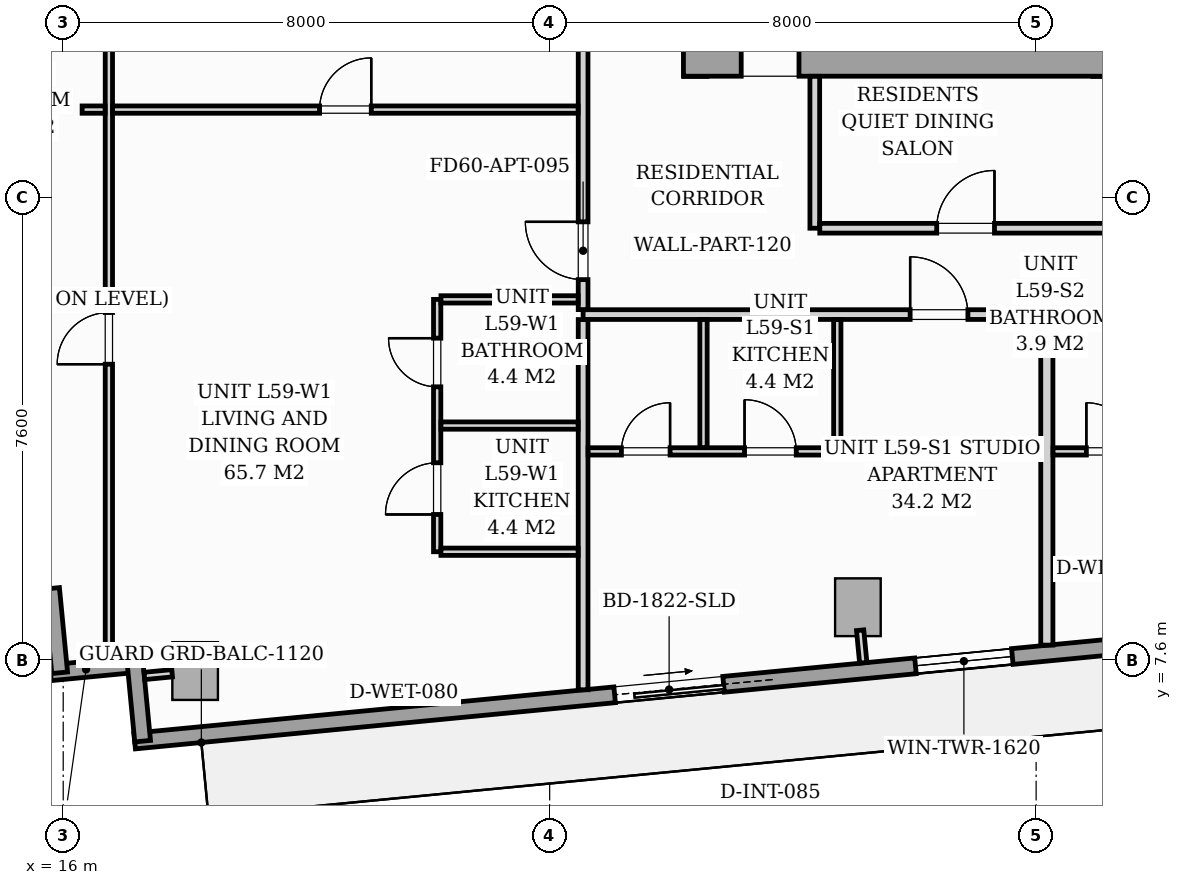
"""IFC4 building model, lengths in metres.
Left out: names, types, materials, properties, quantities, classifications, styles, units other than length and angle.
Written with IfcOpenShell. Run it as: python <this file> out.ifc"""

import sys

from ifc_helpers import new_model, si_unit, direction, frame, frame_2d, origin, origin_2d, place, context, subcontext, project, spatial, rectangle, i_section, extrude, source, transform, mapped, element, fill, save


model = new_model("IFC4")
c1 = context("Model", 3, precision=1e-05, world=origin(), true_north=direction((0.0, 1.0)))
c2 = subcontext(c1, "Body", "Model", "MODEL_VIEW")
j1 = project(units=[si_unit("LENGTHUNIT", "METRE"), si_unit("PLANEANGLEUNIT", "RADIAN")], contexts=[c1])
p1 = place(None, origin())
s1 = spatial("IfcSite", under=j1, at=p1, CompositionType="ELEMENT")
p2 = place(p1, origin())
s2 = spatial("IfcBuilding", under=s1, at=p2, CompositionType="ELEMENT")
p3 = place(p2, frame((0.0, 0.0, 205.0)))
s3 = spatial("IfcBuildingStorey", under=s2, at=p3, CompositionType="ELEMENT", Elevation=205.0)
m1 = source(origin(), c2, "Body", "SweptSolid", [
    extrude(i_section(OverallWidth=0.416, OverallDepth=0.446, WebThickness=0.039, FlangeThickness=0.063, FilletRadius=0.018, at=origin_2d()), origin(), (0.0, 0.0, 1.0), 3.196),
])
for number, where, z_axis, x_axis in (
    (1, (26.4, 17.4, 0.002), (0.0, 0.0, 1.0), (1.0, 0.0, 0.0)),
    (2, (33.12, 17.4, 0.002), (0.0, 0.0, 1.0), (1.0, 0.0, 0.0)),
):
    element("IfcColumn", number, at=place(p3, frame(where, z_axis=z_axis, x_axis=x_axis)), inside=s3, PredefinedType="PILASTER", context=c2, shape_type="MappedRepresentation", body=[
        mapped(m1, transform((0.0, 0.0, 0.0), scale=1.0)),
    ])
m2 = source(origin(), c2, "Body", "SweptSolid", [
    extrude(rectangle(XDim=0.75, YDim=0.95, at=origin_2d()), origin(), (0.0, 0.0, 1.0), 3.196),
])
for number, where, z_axis, x_axis in (
    (3, (18.169, 7.418, 0.002), (0.0, 0.0, 1.0), (0.995, 0.096, 0.0)),
    (4, (29.069, 8.467, 0.002), (0.0, 0.0, 1.0), (0.995, 0.096, 0.0)),
):
    element("IfcColumn", number, at=place(p3, frame(where, z_axis=z_axis, x_axis=x_axis)), inside=s3, PredefinedType="COLUMN", context=c2, shape_type="MappedRepresentation", body=[
        mapped(m2, transform((0.0, 0.0, 0.0), scale=1.0)),
    ])
p4 = place(p3, frame((17.07, 7.513, 0.0), z_axis=(0.0, 0.0, 1.0), x_axis=(-0.995391056452, -0.09589913835, 0.0)))
e5 = element("IfcWall", 5, at=p4, inside=s3, PredefinedType="STANDARD", context=c2, shape_type="SweptSolid", body=[
    extrude(rectangle(XDim=1.395, YDim=0.26, at=frame_2d((0.698, 0.0))), origin(), (0.0, 0.0, 1.0), 2.94),
])
p5 = place(p3, frame((15.942, 7.389, 0.0), z_axis=(0.0, 0.0, 1.0), x_axis=(-0.095742423056, 0.99540614245, 0.0)))
e6 = element("IfcWall", 6, at=p5, inside=s3, PredefinedType="STANDARD", context=c2, shape_type="SweptSolid", body=[
    extrude(rectangle(XDim=1.395, YDim=0.26, at=frame_2d((0.697, 0.0))), origin(), (0.0, 0.0, 1.0), 2.94),
])
p6 = place(p3, frame((33.201, 7.81, 0.0), z_axis=(0.0, 0.0, 1.0), x_axis=(-0.995397074604, -0.095836652014, 0.0)))
e7 = element("IfcWall", 7, at=p6, inside=s3, PredefinedType="STANDARD", context=c2, shape_type="SweptSolid", body=[
    extrude(rectangle(XDim=16.1, YDim=0.26, at=frame_2d((8.05, 0.0))), origin(), (0.0, 0.0, 1.0), 2.94),
])
p7 = place(p6, frame((6.37, 0.0, 0.0)))
e8 = element("IfcOpeningElement", 8, at=p7, cuts=e7, PredefinedType="OPENING", context=c2, shape_type="SweptSolid", body=[
    extrude(rectangle(XDim=1.8, YDim=2.06, at=frame_2d((0.9, 1.03))), frame((0.0, 0.14, 0.0), z_axis=(0.0, -1.0, 0.0), x_axis=(1.0, 0.0, 0.0)), (0.0, 0.0, 1.0), 0.28),
])
p8 = place(p6, frame((1.6, 0.0, 0.65)))
e9 = element("IfcOpeningElement", 9, at=p8, cuts=e7, PredefinedType="OPENING", context=c2, shape_type="SweptSolid", body=[
    extrude(rectangle(XDim=1.6, YDim=1.5, at=frame_2d((0.8, 0.75))), frame((0.0, 0.14, 0.0), z_axis=(0.0, -1.0, 0.0), x_axis=(1.0, 0.0, 0.0)), (0.0, 0.0, 1.0), 0.28),
])
p9 = place(p3, frame((17.306, 6.265, 0.0), z_axis=(0.0, 0.0, 1.0), x_axis=(-0.095915846097, 0.995389446633, 0.0)))
e10 = element("IfcWall", 10, at=p9, inside=s3, PredefinedType="STANDARD", context=c2, shape_type="SweptSolid", body=[
    extrude(rectangle(XDim=1.395, YDim=0.26, at=frame_2d((0.697, 0.0))), origin(), (0.0, 0.0, 1.0), 2.94),
])
p10 = place(p3, frame((26.2, 17.5, 0.0), z_axis=(0.0, 0.0, 1.0), x_axis=(1.0, 0.0, 0.0)))
e11 = element("IfcWall", 11, at=p10, inside=s3, PredefinedType="SHEAR", context=c2, shape_type="SweptSolid", body=[
    extrude(rectangle(XDim=19.6, YDim=0.6, at=frame_2d((9.8, 0.0))), origin(), (0.0, 0.0, 1.0), 3.2),
])
p11 = place(p10, frame((0.95, 0.0, 0.0)))
e12 = element("IfcOpeningElement", 12, at=p11, cuts=e11, PredefinedType="OPENING", context=c2, shape_type="SweptSolid", body=[
    extrude(rectangle(XDim=0.95, YDim=2.06, at=frame_2d((0.475, 1.03))), frame((0.0, 0.31, 0.0), z_axis=(0.0, -1.0, 0.0), x_axis=(1.0, 0.0, 0.0)), (0.0, 0.0, 1.0), 0.62),
])
p12 = place(p10, frame((9.38, 0.0, 0.0)))
e13 = element("IfcOpeningElement", 13, at=p12, cuts=e11, PredefinedType="OPENING", context=c2, shape_type="SweptSolid", body=[
    extrude(rectangle(XDim=0.85, YDim=2.0, at=frame_2d((0.425, 1.0))), frame((0.0, 0.31, 0.0), z_axis=(0.0, -1.0, 0.0), x_axis=(1.0, 0.0, 0.0)), (0.0, 0.0, 1.0), 0.62),
])
p13 = place(p10, frame((17.55, 0.0, 0.0)))
e14 = element("IfcOpeningElement", 14, at=p13, cuts=e11, PredefinedType="OPENING", context=c2, shape_type="SweptSolid", body=[
    extrude(rectangle(XDim=0.95, YDim=2.06, at=frame_2d((0.475, 1.03))), frame((0.0, 0.31, 0.0), z_axis=(0.0, -1.0, 0.0), x_axis=(1.0, 0.0, 0.0)), (0.0, 0.0, 1.0), 0.62),
])
p14 = place(p3, frame((24.55, 13.28, 0.0), z_axis=(0.0, 0.0, 1.0), x_axis=(1.0, 0.0, 0.0)))
e15 = element("IfcWall", 15, at=p14, inside=s3, PredefinedType="PARTITIONING", context=c2, shape_type="SweptSolid", body=[
    extrude(rectangle(XDim=22.9, YDim=0.16, at=frame_2d((11.45, 0.0))), origin(), (0.0, 0.0, 1.0), 2.94),
])
p15 = place(p14, frame((5.378, 0.0, 0.0)))
e16 = element("IfcOpeningElement", 16, at=p15, cuts=e15, PredefinedType="OPENING", context=c2, shape_type="SweptSolid", body=[
    extrude(rectangle(XDim=0.95, YDim=2.06, at=frame_2d((0.475, 1.03))), frame((0.0, 0.09, 0.0), z_axis=(0.0, -1.0, 0.0), x_axis=(1.0, 0.0, 0.0)), (0.0, 0.0, 1.0), 0.18),
])
p16 = place(p14, frame((13.025, 0.0, 0.0)))
e17 = element("IfcOpeningElement", 17, at=p16, cuts=e15, PredefinedType="OPENING", context=c2, shape_type="SweptSolid", body=[
    extrude(rectangle(XDim=0.95, YDim=2.06, at=frame_2d((0.475, 1.03))), frame((0.0, 0.09, 0.0), z_axis=(0.0, -1.0, 0.0), x_axis=(1.0, 0.0, 0.0)), (0.0, 0.0, 1.0), 0.18),
])
p17 = place(p14, frame((16.572, 0.0, 0.0)))
e18 = element("IfcOpeningElement", 18, at=p17, cuts=e15, PredefinedType="OPENING", context=c2, shape_type="SweptSolid", body=[
    extrude(rectangle(XDim=0.95, YDim=2.06, at=frame_2d((0.475, 1.03))), frame((0.0, 0.09, 0.0), z_axis=(0.0, -1.0, 0.0), x_axis=(1.0, 0.0, 0.0)), (0.0, 0.0, 1.0), 0.18),
])
p18 = place(p3, frame((24.55, 7.11, 0.0), z_axis=(0.0, 0.0, 1.0), x_axis=(0.0, 1.0, 0.0)))
e19 = element("IfcWall", 19, at=p18, inside=s3, PredefinedType="PARTITIONING", context=c2, shape_type="SweptSolid", body=[
    extrude(rectangle(XDim=6.088, YDim=0.16, at=frame_2d((3.044, 0.0))), origin(), (0.0, 0.0, 1.0), 2.94),
])
p19 = place(p3, frame((24.55, 13.362, 0.0), z_axis=(0.0, 0.0, 1.0), x_axis=(0.0, 1.0, 0.0)))
e20 = element("IfcWall", 20, at=p19, inside=s3, PredefinedType="PARTITIONING", context=c2, shape_type="SweptSolid", body=[
    extrude(rectangle(XDim=7.288, YDim=0.16, at=frame_2d((3.644, 0.0))), origin(), (0.0, 0.0, 1.0), 2.94),
])
p20 = place(p19, frame((0.493, 0.0, 0.0)))
e21 = element("IfcOpeningElement", 21, at=p20, cuts=e20, PredefinedType="OPENING", context=c2, shape_type="SweptSolid", body=[
    extrude(rectangle(XDim=0.95, YDim=2.06, at=frame_2d((0.475, 1.03))), frame((0.0, 0.09, 0.0), z_axis=(0.0, -1.0, 0.0), x_axis=(1.0, 0.0, 0.0)), (0.0, 0.0, 1.0), 0.18),
])
p21 = place(p19, frame((5.623, 0.0, 0.0)))
e22 = element("IfcOpeningElement", 22, at=p21, cuts=e20, PredefinedType="OPENING", context=c2, shape_type="SweptSolid", body=[
    extrude(rectangle(XDim=0.95, YDim=2.06, at=frame_2d((0.475, 1.03))), frame((0.0, 0.09, 0.0), z_axis=(0.0, -1.0, 0.0), x_axis=(1.0, 0.0, 0.0)), (0.0, 0.0, 1.0), 0.18),
])
p22 = place(p3, frame((24.632, 11.03, 0.0), z_axis=(0.0, 0.0, 1.0), x_axis=(1.0, 0.0, 0.0)))
e23 = element("IfcWall", 23, at=p22, inside=s3, PredefinedType="PARTITIONING", context=c2, shape_type="SweptSolid", body=[
    extrude(rectangle(XDim=4.098, YDim=0.12, at=frame_2d((2.049, 0.0))), origin(), (0.0, 0.0, 1.0), 2.94),
])
p23 = place(p22, frame((0.548, 0.0, 0.0)))
e24 = element("IfcOpeningElement", 24, at=p23, cuts=e23, PredefinedType="OPENING", context=c2, shape_type="SweptSolid", body=[
    extrude(rectangle(XDim=0.8, YDim=2.02, at=frame_2d((0.4, 1.01))), frame((0.0, 0.07, 0.0), z_axis=(0.0, -1.0, 0.0), x_axis=(1.0, 0.0, 0.0)), (0.0, 0.0, 1.0), 0.14),
])
p24 = place(p22, frame((2.573, 0.0, 0.0)))
e25 = element("IfcOpeningElement", 25, at=p24, cuts=e23, PredefinedType="OPENING", context=c2, shape_type="SweptSolid", body=[
    extrude(rectangle(XDim=0.85, YDim=2.05, at=frame_2d((0.425, 1.025))), frame((0.0, 0.07, 0.0), z_axis=(0.0, -1.0, 0.0), x_axis=(1.0, 0.0, 0.0)), (0.0, 0.0, 1.0), 0.14),
])
for number, where, z_axis, x_axis in (
    (26, (28.73, 11.092, 0.0), (0.0, 0.0, 1.0), (0.0, 1.0, 0.0)),
    (27, (26.53, 11.092, 0.0), (0.0, 0.0, 1.0), (0.0, 1.0, 0.0)),
):
    element("IfcWall", number, at=place(p3, frame(where, z_axis=z_axis, x_axis=x_axis)), inside=s3, PredefinedType="PARTITIONING", context=c2, shape_type="SweptSolid", body=[
        extrude(rectangle(XDim=2.106, YDim=0.12, at=frame_2d((1.053, 0.0))), origin(), (0.0, 0.0, 1.0), 2.94),
    ])
p25 = place(p3, frame((32.176, 7.844, 0.0), z_axis=(0.0, 0.0, 1.0), x_axis=(0.0, 1.0, 0.0)))
e28 = element("IfcWall", 28, at=p25, inside=s3, PredefinedType="PARTITIONING", context=c2, shape_type="SweptSolid", body=[
    extrude(rectangle(XDim=5.354, YDim=0.2, at=frame_2d((2.677, 0.0))), origin(), (0.0, 0.0, 1.0), 2.94),
])
p26 = place(p3, frame((32.278, 11.03, 0.0), z_axis=(0.0, 0.0, 1.0), x_axis=(1.0, 0.0, 0.0)))
e29 = element("IfcWall", 29, at=p26, inside=s3, PredefinedType="PARTITIONING", context=c2, shape_type="SweptSolid", body=[
    extrude(rectangle(XDim=4.098, YDim=0.12, at=frame_2d((2.049, 0.0))), origin(), (0.0, 0.0, 1.0), 2.94),
])
p27 = place(p26, frame((0.548, 0.0, 0.0)))
e30 = element("IfcOpeningElement", 30, at=p27, cuts=e29, PredefinedType="OPENING", context=c2, shape_type="SweptSolid", body=[
    extrude(rectangle(XDim=0.8, YDim=2.02, at=frame_2d((0.4, 1.01))), frame((0.0, 0.07, 0.0), z_axis=(0.0, -1.0, 0.0), x_axis=(1.0, 0.0, 0.0)), (0.0, 0.0, 1.0), 0.14),
])
p28 = place(p26, frame((2.573, 0.0, 0.0)))
e31 = element("IfcOpeningElement", 31, at=p28, cuts=e29, PredefinedType="OPENING", context=c2, shape_type="SweptSolid", body=[
    extrude(rectangle(XDim=0.85, YDim=2.05, at=frame_2d((0.425, 1.025))), frame((0.0, 0.07, 0.0), z_axis=(0.0, -1.0, 0.0), x_axis=(1.0, 0.0, 0.0)), (0.0, 0.0, 1.0), 0.14),
])
p29 = place(p3, frame((22.15, 9.38, 0.0), z_axis=(0.0, 0.0, 1.0), x_axis=(0.0, 1.0, 0.0)))
e32 = element("IfcWall", 32, at=p29, inside=s3, PredefinedType="PARTITIONING", context=c2, shape_type="SweptSolid", body=[
    extrude(rectangle(XDim=4.15, YDim=0.12, at=frame_2d((2.075, 0.0))), origin(), (0.0, 0.0, 1.0), 2.94),
])
p30 = place(p29, frame((0.613, 0.0, 0.0)))
e33 = element("IfcOpeningElement", 33, at=p30, cuts=e32, PredefinedType="OPENING", context=c2, shape_type="SweptSolid", body=[
    extrude(rectangle(XDim=0.85, YDim=2.05, at=frame_2d((0.425, 1.025))), frame((0.0, 0.07, 0.0), z_axis=(0.0, -1.0, 0.0), x_axis=(1.0, 0.0, 0.0)), (0.0, 0.0, 1.0), 0.14),
])
p31 = place(p29, frame((2.712, 0.0, 0.0)))
e34 = element("IfcOpeningElement", 34, at=p31, cuts=e32, PredefinedType="OPENING", context=c2, shape_type="SweptSolid", body=[
    extrude(rectangle(XDim=0.8, YDim=2.02, at=frame_2d((0.4, 1.01))), frame((0.0, 0.07, 0.0), z_axis=(0.0, -1.0, 0.0), x_axis=(1.0, 0.0, 0.0)), (0.0, 0.0, 1.0), 0.14),
])
for number, where, z_axis, x_axis in (
    (35, (22.212, 11.455, 0.0), (0.0, 0.0, 1.0), (1.0, 0.0, 0.0)),
    (36, (22.212, 9.38, 0.0), (0.0, 0.0, 1.0), (1.0, 0.0, 0.0)),
    (37, (22.212, 13.53, 0.0), (0.0, 0.0, 1.0), (1.0, 0.0, 0.0)),
):
    element("IfcWall", number, at=place(p3, frame(where, z_axis=z_axis, x_axis=x_axis)), inside=s3, PredefinedType="PARTITIONING", context=c2, shape_type="SweptSolid", body=[
        extrude(rectangle(XDim=2.256, YDim=0.12, at=frame_2d((1.128, 0.0))), origin(), (0.0, 0.0, 1.0), 2.94),
    ])
p32 = place(p3, frame((16.751, 7.615, 0.0), z_axis=(0.0, 0.0, 1.0), x_axis=(0.0, 1.0, 0.0)))
e38 = element("IfcWall", 38, at=p32, inside=s3, PredefinedType="PARTITIONING", context=c2, shape_type="SweptSolid", body=[
    extrude(rectangle(XDim=10.833, YDim=0.12, at=frame_2d((5.417, 0.0))), origin(), (0.0, 0.0, 1.0), 2.94),
])
p33 = place(p32, frame((4.849, 0.0, 0.0)))
e39 = element("IfcOpeningElement", 39, at=p33, cuts=e38, PredefinedType="OPENING", context=c2, shape_type="SweptSolid", body=[
    extrude(rectangle(XDim=0.85, YDim=2.05, at=frame_2d((0.425, 1.025))), frame((0.0, 0.07, 0.0), z_axis=(0.0, -1.0, 0.0), x_axis=(1.0, 0.0, 0.0)), (0.0, 0.0, 1.0), 0.14),
])
p34 = place(p3, frame((16.311, 16.651, 0.0), z_axis=(0.0, 0.0, 1.0), x_axis=(1.0, 0.0, 0.0)))
e40 = element("IfcWall", 40, at=p34, inside=s3, PredefinedType="PARTITIONING", context=c2, shape_type="SweptSolid", body=[
    extrude(rectangle(XDim=0.378, YDim=0.12, at=frame_2d((0.189, 0.0))), origin(), (0.0, 0.0, 1.0), 2.94),
])
p35 = place(p3, frame((16.813, 16.651, 0.0), z_axis=(0.0, 0.0, 1.0), x_axis=(1.0, 0.0, 0.0)))
e41 = element("IfcWall", 41, at=p35, inside=s3, PredefinedType="PARTITIONING", context=c2, shape_type="SweptSolid", body=[
    extrude(rectangle(XDim=7.655, YDim=0.12, at=frame_2d((3.828, 0.0))), origin(), (0.0, 0.0, 1.0), 2.281),
])
p36 = place(p35, frame((3.403, 0.0, 0.0)))
e42 = element("IfcOpeningElement", 42, at=p36, cuts=e41, PredefinedType="OPENING", context=c2, shape_type="SweptSolid", body=[
    extrude(rectangle(XDim=0.85, YDim=2.05, at=frame_2d((0.425, 1.025))), frame((0.0, 0.07, 0.0), z_axis=(0.0, -1.0, 0.0), x_axis=(1.0, 0.0, 0.0)), (0.0, 0.0, 1.0), 0.14),
])
p37 = place(p3, frame((28.36, 14.7, 0.0), z_axis=(0.0, 0.0, 1.0), x_axis=(0.0, 1.0, 0.0)))
e43 = element("IfcWall", 43, at=p37, inside=s3, PredefinedType="PARTITIONING", context=c2, shape_type="SweptSolid", body=[
    extrude(rectangle(XDim=2.498, YDim=0.16, at=frame_2d((1.249, 0.0))), origin(), (0.0, 0.0, 1.0), 2.94),
])
p38 = place(p3, frame((28.442, 14.7, 0.0), z_axis=(0.0, 0.0, 1.0), x_axis=(1.0, 0.0, 0.0)))
e44 = element("IfcWall", 44, at=p38, inside=s3, PredefinedType="PARTITIONING", context=c2, shape_type="SweptSolid", body=[
    extrude(rectangle(XDim=4.796, YDim=0.16, at=frame_2d((2.398, 0.0))), origin(), (0.0, 0.0, 1.0), 2.94),
])
p39 = place(p38, frame((1.923, 0.0, 0.0)))
e45 = element("IfcOpeningElement", 45, at=p39, cuts=e44, PredefinedType="OPENING", context=c2, shape_type="SweptSolid", body=[
    extrude(rectangle(XDim=0.95, YDim=2.06, at=frame_2d((0.475, 1.03))), frame((0.0, 0.09, 0.0), z_axis=(0.0, -1.0, 0.0), x_axis=(1.0, 0.0, 0.0)), (0.0, 0.0, 1.0), 0.18),
])
p40 = place(p3, frame((17.791, 7.382, 0.0), z_axis=(0.0, 0.0, 1.0), x_axis=(-0.995384576284, -0.09596637586, 0.0)))
e46 = element("IfcWall", 46, at=p40, inside=s3, PredefinedType="PARTITIONING", context=c2, shape_type="SweptSolid", body=[
    extrude(rectangle(XDim=0.458, YDim=0.12, at=frame_2d((0.229, 0.0))), origin(), (0.0, 0.0, 1.0), 2.94),
])
p41 = place(p3, frame((29.105, 8.089, 0.0), z_axis=(0.0, 0.0, 1.0), x_axis=(0.095772948675, -0.995403205893, 0.0)))
e47 = element("IfcWall", 47, at=p41, inside=s3, PredefinedType="PARTITIONING", context=c2, shape_type="SweptSolid", body=[
    extrude(rectangle(XDim=0.538, YDim=0.12, at=frame_2d((0.269, 0.0))), origin(), (0.0, 0.0, 1.0), 2.94),
])
m3 = source(origin(), c2, "Body", "SweptSolid", [
    extrude(rectangle(XDim=1.8, YDim=2.06, at=frame_2d((0.9, 1.03))), frame((0.0, 0.025, 0.0), z_axis=(0.0, -1.0, 0.0), x_axis=(1.0, 0.0, 0.0)), (0.0, 0.0, 1.0), 0.05),
])
p42 = place(p7, origin())
e48 = element("IfcDoor", 48, at=p42, inside=s3, OperationType="SLIDING_TO_LEFT", PredefinedType="DOOR", context=c2, shape_type="MappedRepresentation", body=[
    mapped(m3, transform((0.0, 0.0, 0.0), scale=1.0)),
])
fill(e8, e48)
m4 = source(origin(), c2, "Body", "SweptSolid", [
    extrude(rectangle(XDim=1.6, YDim=1.5, at=frame_2d((0.8, 0.75))), frame((0.0, 0.03, 0.0), z_axis=(0.0, -1.0, 0.0), x_axis=(1.0, 0.0, 0.0)), (0.0, 0.0, 1.0), 0.06),
])
p43 = place(p8, origin())
e49 = element("IfcWindow", 49, at=p43, inside=s3, PartitioningType="SINGLE_PANEL", PredefinedType="WINDOW", context=c2, shape_type="MappedRepresentation", body=[
    mapped(m4, transform((0.0, 0.0, 0.0), scale=1.0)),
])
fill(e9, e49)
m5 = source(origin(), c2, "Body", "SweptSolid", [
    extrude(rectangle(XDim=0.95, YDim=2.06, at=frame_2d((0.475, 1.03))), frame((0.0, 0.025, 0.0), z_axis=(0.0, -1.0, 0.0), x_axis=(1.0, 0.0, 0.0)), (0.0, 0.0, 1.0), 0.05),
])
p44 = place(p11, origin())
e50 = element("IfcDoor", 50, at=p44, inside=s3, OperationType="SINGLE_SWING_LEFT", PredefinedType="DOOR", context=c2, shape_type="MappedRepresentation", body=[
    mapped(m5, transform((0.0, 0.0, 0.0), scale=1.0)),
])
fill(e12, e50)
m6 = source(origin(), c2, "Body", "SweptSolid", [
    extrude(rectangle(XDim=0.95, YDim=2.06, at=frame_2d((0.475, 1.03))), frame((0.0, 0.025, 0.0), z_axis=(0.0, -1.0, 0.0), x_axis=(1.0, 0.0, 0.0)), (0.0, 0.0, 1.0), 0.05),
])
p45 = place(p15, origin())
e51 = element("IfcDoor", 51, at=p45, inside=s3, OperationType="SINGLE_SWING_LEFT", PredefinedType="DOOR", context=c2, shape_type="MappedRepresentation", body=[
    mapped(m6, transform((0.0, 0.0, 0.0), scale=1.0)),
])
fill(e16, e51)
m7 = source(origin(), c2, "Body", "SweptSolid", [
    extrude(rectangle(XDim=0.8, YDim=2.02, at=frame_2d((0.4, 1.01))), frame((0.0, 0.025, 0.0), z_axis=(0.0, -1.0, 0.0), x_axis=(1.0, 0.0, 0.0)), (0.0, 0.0, 1.0), 0.05),
])
p46 = place(p23, origin())
e52 = element("IfcDoor", 52, at=p46, inside=s3, OperationType="SINGLE_SWING_RIGHT", PredefinedType="DOOR", context=c2, shape_type="MappedRepresentation", body=[
    mapped(m7, transform((0.0, 0.0, 0.0), scale=1.0)),
])
fill(e24, e52)
m8 = source(origin(), c2, "Body", "SweptSolid", [
    extrude(rectangle(XDim=0.85, YDim=2.05, at=frame_2d((0.425, 1.025))), frame((0.0, 0.025, 0.0), z_axis=(0.0, -1.0, 0.0), x_axis=(1.0, 0.0, 0.0)), (0.0, 0.0, 1.0), 0.05),
])
p47 = place(p24, origin())
e53 = element("IfcDoor", 53, at=p47, inside=s3, OperationType="SINGLE_SWING_LEFT", PredefinedType="DOOR", context=c2, shape_type="MappedRepresentation", body=[
    mapped(m8, transform((0.0, 0.0, 0.0), scale=1.0)),
])
fill(e25, e53)
p48 = place(p27, origin())
e54 = element("IfcDoor", 54, at=p48, inside=s3, OperationType="SINGLE_SWING_LEFT", PredefinedType="DOOR", context=c2, shape_type="MappedRepresentation", body=[
    mapped(m7, transform((0.0, 0.0, 0.0), scale=1.0)),
])
fill(e30, e54)
p49 = place(p20, origin())
e55 = element("IfcDoor", 55, at=p49, inside=s3, OperationType="SINGLE_SWING_RIGHT", PredefinedType="DOOR", context=c2, shape_type="MappedRepresentation", body=[
    mapped(m6, transform((0.0, 0.0, 0.0), scale=1.0)),
])
fill(e21, e55)
p50 = place(p30, origin())
e56 = element("IfcDoor", 56, at=p50, inside=s3, OperationType="SINGLE_SWING_LEFT", PredefinedType="DOOR", context=c2, shape_type="MappedRepresentation", body=[
    mapped(m8, transform((0.0, 0.0, 0.0), scale=1.0)),
])
fill(e33, e56)
p51 = place(p31, origin())
e57 = element("IfcDoor", 57, at=p51, inside=s3, OperationType="SINGLE_SWING_RIGHT", PredefinedType="DOOR", context=c2, shape_type="MappedRepresentation", body=[
    mapped(m7, transform((0.0, 0.0, 0.0), scale=1.0)),
])
fill(e34, e57)
p52 = place(p33, origin())
e58 = element("IfcDoor", 58, at=p52, inside=s3, OperationType="SINGLE_SWING_LEFT", PredefinedType="DOOR", context=c2, shape_type="MappedRepresentation", body=[
    mapped(m8, transform((0.0, 0.0, 0.0), scale=1.0)),
])
fill(e39, e58)
p53 = place(p36, origin())
e59 = element("IfcDoor", 59, at=p53, inside=s3, OperationType="SINGLE_SWING_RIGHT", PredefinedType="DOOR", context=c2, shape_type="MappedRepresentation", body=[
    mapped(m8, transform((0.0, 0.0, 0.0), scale=1.0)),
])
fill(e42, e59)
p54 = place(p39, origin())
e60 = element("IfcDoor", 60, at=p54, inside=s3, OperationType="SINGLE_SWING_RIGHT", PredefinedType="DOOR", context=c2, shape_type="MappedRepresentation", body=[
    mapped(m6, transform((0.0, 0.0, 0.0), scale=1.0)),
])
fill(e45, e60)
save(model, sys.argv[1])
